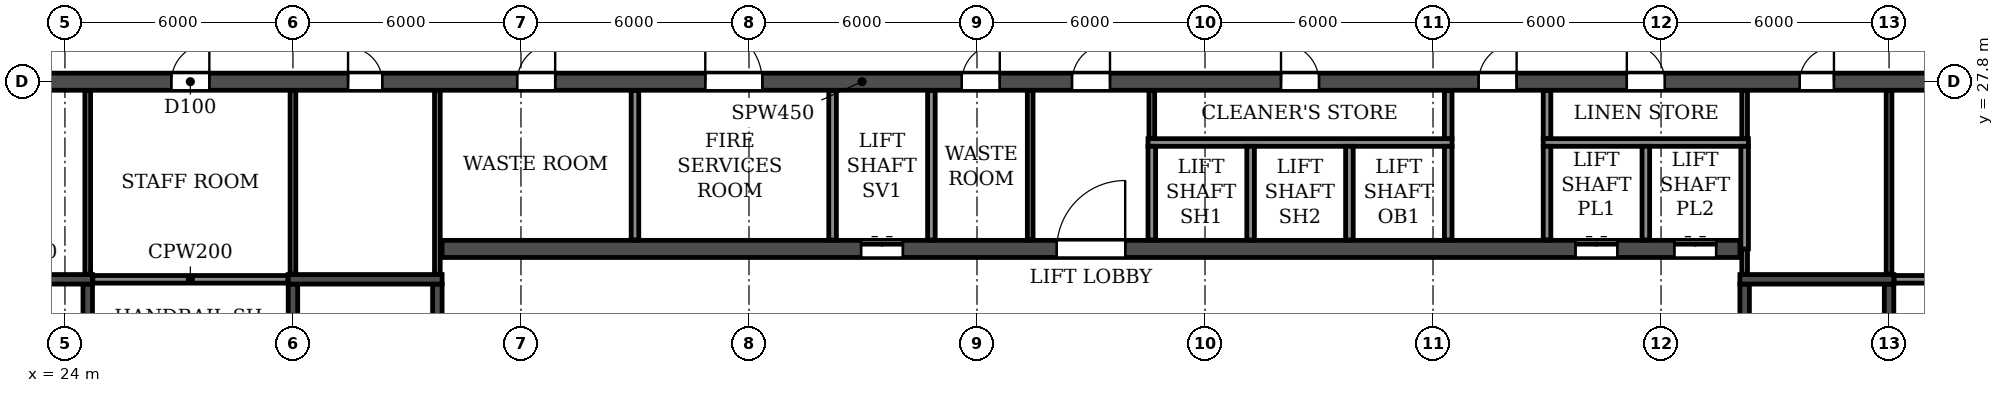
"""IFC4 building model, lengths in metres.
Left out: names, types, materials, properties, quantities, classifications, styles, units other than length and angle.
Written with IfcOpenShell. Run it as: python <this file> out.ifc"""

import sys

from ifc_helpers import new_model, si_unit, direction, frame, frame_2d, origin, place, context, subcontext, project, spatial, rectangle, extrude, element, fill, save


model = new_model("IFC4")
c1 = context("Model", 3, precision=1e-05, world=origin(), true_north=direction((0.0, 1.0)))
c2 = subcontext(c1, "Body", "Model", "MODEL_VIEW")
j1 = project(units=[si_unit("LENGTHUNIT", "METRE"), si_unit("PLANEANGLEUNIT", "RADIAN")], contexts=[c1])
p1 = place(None, origin())
s1 = spatial("IfcSite", under=j1, at=p1, CompositionType="ELEMENT")
p2 = place(p1, origin())
s2 = spatial("IfcBuilding", under=s1, at=p2, CompositionType="ELEMENT")
p3 = place(p2, frame((0.0, 0.0, 19.2)))
s3 = spatial("IfcBuildingStorey", under=s2, at=p3, CompositionType="ELEMENT", Elevation=19.2)
p4 = place(p3, frame((18.0, 27.8, 0.0), z_axis=(0.0, 0.0, 1.0), x_axis=(1.0, 0.0, 0.0)))
e1 = element("IfcWall", 1, at=p4, inside=s3, PredefinedType="SOLIDWALL", context=c2, shape_type="SweptSolid", body=[
    extrude(rectangle(XDim=66.0, YDim=0.45, at=frame_2d((33.0, 0.0))), origin(), (0.0, 0.0, 1.0), 3.95),
])
p5 = place(p4, frame((0.9, 0.0, 0.0)))
e2 = element("IfcOpeningElement", 2, at=p5, cuts=e1, PredefinedType="OPENING", context=c2, shape_type="SweptSolid", body=[
    extrude(rectangle(XDim=1.0, YDim=2.1, at=frame_2d((0.5, 1.05))), frame((0.0, 0.235, 0.0), z_axis=(0.0, -1.0, 0.0), x_axis=(1.0, 0.0, 0.0)), (0.0, 0.0, 1.0), 0.47),
])
p6 = place(p4, frame((4.25, 0.0, 0.0)))
e3 = element("IfcOpeningElement", 3, at=p6, cuts=e1, PredefinedType="OPENING", context=c2, shape_type="SweptSolid", body=[
    extrude(rectangle(XDim=0.9, YDim=2.1, at=frame_2d((0.45, 1.05))), frame((0.0, 0.235, 0.0), z_axis=(0.0, -1.0, 0.0), x_axis=(1.0, 0.0, 0.0)), (0.0, 0.0, 1.0), 0.47),
])
p7 = place(p4, frame((8.8, 0.0, 0.0)))
e4 = element("IfcOpeningElement", 4, at=p7, cuts=e1, PredefinedType="OPENING", context=c2, shape_type="SweptSolid", body=[
    extrude(rectangle(XDim=1.0, YDim=2.1, at=frame_2d((0.5, 1.05))), frame((0.0, 0.235, 0.0), z_axis=(0.0, -1.0, 0.0), x_axis=(1.0, 0.0, 0.0)), (0.0, 0.0, 1.0), 0.47),
])
p8 = place(p4, frame((13.45, 0.0, 0.0)))
e5 = element("IfcOpeningElement", 5, at=p8, cuts=e1, PredefinedType="OPENING", context=c2, shape_type="SweptSolid", body=[
    extrude(rectangle(XDim=0.9, YDim=2.1, at=frame_2d((0.45, 1.05))), frame((0.0, 0.235, 0.0), z_axis=(0.0, -1.0, 0.0), x_axis=(1.0, 0.0, 0.0)), (0.0, 0.0, 1.0), 0.47),
])
p9 = place(p4, frame((17.9, 0.0, 0.0)))
e6 = element("IfcOpeningElement", 6, at=p9, cuts=e1, PredefinedType="OPENING", context=c2, shape_type="SweptSolid", body=[
    extrude(rectangle(XDim=1.0, YDim=2.1, at=frame_2d((0.5, 1.05))), frame((0.0, 0.235, 0.0), z_axis=(0.0, -1.0, 0.0), x_axis=(1.0, 0.0, 0.0)), (0.0, 0.0, 1.0), 0.47),
])
p10 = place(p4, frame((22.85, 0.0, 0.0)))
e7 = element("IfcOpeningElement", 7, at=p10, cuts=e1, PredefinedType="OPENING", context=c2, shape_type="SweptSolid", body=[
    extrude(rectangle(XDim=1.5, YDim=2.1, at=frame_2d((0.75, 1.05))), frame((0.0, 0.235, 0.0), z_axis=(0.0, -1.0, 0.0), x_axis=(1.0, 0.0, 0.0)), (0.0, 0.0, 1.0), 0.47),
])
p11 = place(p4, frame((29.6, 0.0, 0.0)))
e8 = element("IfcOpeningElement", 8, at=p11, cuts=e1, PredefinedType="OPENING", context=c2, shape_type="SweptSolid", body=[
    extrude(rectangle(XDim=1.0, YDim=2.1, at=frame_2d((0.5, 1.05))), frame((0.0, 0.235, 0.0), z_axis=(0.0, -1.0, 0.0), x_axis=(1.0, 0.0, 0.0)), (0.0, 0.0, 1.0), 0.47),
])
p12 = place(p4, frame((32.5, 0.0, 0.0)))
e9 = element("IfcOpeningElement", 9, at=p12, cuts=e1, PredefinedType="OPENING", context=c2, shape_type="SweptSolid", body=[
    extrude(rectangle(XDim=1.0, YDim=2.1, at=frame_2d((0.5, 1.05))), frame((0.0, 0.235, 0.0), z_axis=(0.0, -1.0, 0.0), x_axis=(1.0, 0.0, 0.0)), (0.0, 0.0, 1.0), 0.47),
])
p13 = place(p4, frame((38.0, 0.0, 0.0)))
e10 = element("IfcOpeningElement", 10, at=p13, cuts=e1, PredefinedType="OPENING", context=c2, shape_type="SweptSolid", body=[
    extrude(rectangle(XDim=1.0, YDim=2.1, at=frame_2d((0.5, 1.05))), frame((0.0, 0.235, 0.0), z_axis=(0.0, -1.0, 0.0), x_axis=(1.0, 0.0, 0.0)), (0.0, 0.0, 1.0), 0.47),
])
p14 = place(p4, frame((43.2, 0.0, 0.0)))
e11 = element("IfcOpeningElement", 11, at=p14, cuts=e1, PredefinedType="OPENING", context=c2, shape_type="SweptSolid", body=[
    extrude(rectangle(XDim=1.0, YDim=2.1, at=frame_2d((0.5, 1.05))), frame((0.0, 0.235, 0.0), z_axis=(0.0, -1.0, 0.0), x_axis=(1.0, 0.0, 0.0)), (0.0, 0.0, 1.0), 0.47),
])
p15 = place(p4, frame((47.1, 0.0, 0.0)))
e12 = element("IfcOpeningElement", 12, at=p15, cuts=e1, PredefinedType="OPENING", context=c2, shape_type="SweptSolid", body=[
    extrude(rectangle(XDim=1.0, YDim=2.1, at=frame_2d((0.5, 1.05))), frame((0.0, 0.235, 0.0), z_axis=(0.0, -1.0, 0.0), x_axis=(1.0, 0.0, 0.0)), (0.0, 0.0, 1.0), 0.47),
])
p16 = place(p4, frame((51.65, 0.0, 0.0)))
e13 = element("IfcOpeningElement", 13, at=p16, cuts=e1, PredefinedType="OPENING", context=c2, shape_type="SweptSolid", body=[
    extrude(rectangle(XDim=0.9, YDim=2.1, at=frame_2d((0.45, 1.05))), frame((0.0, 0.235, 0.0), z_axis=(0.0, -1.0, 0.0), x_axis=(1.0, 0.0, 0.0)), (0.0, 0.0, 1.0), 0.47),
])
p17 = place(p4, frame((56.2, 0.0, 0.0)))
e14 = element("IfcOpeningElement", 14, at=p17, cuts=e1, PredefinedType="OPENING", context=c2, shape_type="SweptSolid", body=[
    extrude(rectangle(XDim=1.0, YDim=2.1, at=frame_2d((0.5, 1.05))), frame((0.0, 0.235, 0.0), z_axis=(0.0, -1.0, 0.0), x_axis=(1.0, 0.0, 0.0)), (0.0, 0.0, 1.0), 0.47),
])
p18 = place(p4, frame((60.85, 0.0, 0.0)))
e15 = element("IfcOpeningElement", 15, at=p18, cuts=e1, PredefinedType="OPENING", context=c2, shape_type="SweptSolid", body=[
    extrude(rectangle(XDim=0.9, YDim=2.1, at=frame_2d((0.45, 1.05))), frame((0.0, 0.235, 0.0), z_axis=(0.0, -1.0, 0.0), x_axis=(1.0, 0.0, 0.0)), (0.0, 0.0, 1.0), 0.47),
])
p19 = place(p4, frame((64.1, 0.0, 0.0)))
e16 = element("IfcOpeningElement", 16, at=p19, cuts=e1, PredefinedType="OPENING", context=c2, shape_type="SweptSolid", body=[
    extrude(rectangle(XDim=1.0, YDim=2.1, at=frame_2d((0.5, 1.05))), frame((0.0, 0.235, 0.0), z_axis=(0.0, -1.0, 0.0), x_axis=(1.0, 0.0, 0.0)), (0.0, 0.0, 1.0), 0.47),
])
p20 = place(p3, frame((33.925, 23.4, 0.0), z_axis=(0.0, 0.0, 1.0), x_axis=(1.0, 0.0, 0.0)))
e17 = element("IfcWall", 17, at=p20, inside=s3, PredefinedType="SOLIDWALL", context=c2, shape_type="SweptSolid", body=[
    extrude(rectangle(XDim=34.15, YDim=0.45, at=frame_2d((17.075, 0.0))), origin(), (0.0, 0.0, 1.0), 3.95),
])
p21 = place(p20, frame((16.175, 0.0, 0.0)))
e18 = element("IfcOpeningElement", 18, at=p21, cuts=e17, PredefinedType="OPENING", context=c2, shape_type="SweptSolid", body=[
    extrude(rectangle(XDim=1.8, YDim=2.1, at=frame_2d((0.9, 1.05))), frame((0.0, 0.235, 0.0), z_axis=(0.0, -1.0, 0.0), x_axis=(1.0, 0.0, 0.0)), (0.0, 0.0, 1.0), 0.47),
])
p22 = place(p20, frame((11.025, 0.0, 0.0)))
e19 = element("IfcOpeningElement", 19, at=p22, cuts=e17, PredefinedType="OPENING", context=c2, shape_type="SweptSolid", body=[
    extrude(rectangle(XDim=1.1, YDim=2.1, at=frame_2d((0.55, 1.05))), frame((0.0, 0.235, 0.0), z_axis=(0.0, -1.0, 0.0), x_axis=(1.0, 0.0, 0.0)), (0.0, 0.0, 1.0), 0.47),
])
p23 = place(p20, frame((29.825, 0.0, 0.0)))
e20 = element("IfcOpeningElement", 20, at=p23, cuts=e17, PredefinedType="OPENING", context=c2, shape_type="SweptSolid", body=[
    extrude(rectangle(XDim=1.1, YDim=2.1, at=frame_2d((0.55, 1.05))), frame((0.0, 0.235, 0.0), z_axis=(0.0, -1.0, 0.0), x_axis=(1.0, 0.0, 0.0)), (0.0, 0.0, 1.0), 0.47),
])
p24 = place(p20, frame((32.425, 0.0, 0.0)))
e21 = element("IfcOpeningElement", 21, at=p24, cuts=e17, PredefinedType="OPENING", context=c2, shape_type="SweptSolid", body=[
    extrude(rectangle(XDim=1.1, YDim=2.1, at=frame_2d((0.55, 1.05))), frame((0.0, 0.235, 0.0), z_axis=(0.0, -1.0, 0.0), x_axis=(1.0, 0.0, 0.0)), (0.0, 0.0, 1.0), 0.47),
])
p25 = place(p3, frame((30.0, 14.825, 0.0), z_axis=(0.0, 0.0, 1.0), x_axis=(0.0, 1.0, 0.0)))
e22 = element("IfcWall", 22, at=p25, inside=s3, PredefinedType="SOLIDWALL", context=c2, shape_type="SweptSolid", body=[
    extrude(rectangle(XDim=7.65, YDim=0.25, at=frame_2d((3.825, 0.0))), origin(), (0.0, 0.0, 1.0), 3.95),
])
p26 = place(p3, frame((33.8, 14.825, 0.0), z_axis=(0.0, 0.0, 1.0), x_axis=(0.0, 1.0, 0.0)))
e23 = element("IfcWall", 23, at=p26, inside=s3, PredefinedType="SOLIDWALL", context=c2, shape_type="SweptSolid", body=[
    extrude(rectangle(XDim=7.65, YDim=0.25, at=frame_2d((3.825, 0.0))), origin(), (0.0, 0.0, 1.0), 3.95),
])
p27 = place(p26, frame((0.475, 0.0, 0.0)))
e24 = element("IfcOpeningElement", 24, at=p27, cuts=e23, PredefinedType="OPENING", context=c2, shape_type="SweptSolid", body=[
    extrude(rectangle(XDim=1.0, YDim=2.1, at=frame_2d((0.5, 1.05))), frame((0.0, 0.135, 0.0), z_axis=(0.0, -1.0, 0.0), x_axis=(1.0, 0.0, 0.0)), (0.0, 0.0, 1.0), 0.27),
])
p28 = place(p3, frame((29.875, 22.6, 0.0), z_axis=(0.0, 0.0, 1.0), x_axis=(1.0, 0.0, 0.0)))
e25 = element("IfcWall", 25, at=p28, inside=s3, PredefinedType="SOLIDWALL", context=c2, shape_type="SweptSolid", body=[
    extrude(rectangle(XDim=4.05, YDim=0.25, at=frame_2d((2.025, 0.0))), origin(), (0.0, 0.0, 1.0), 3.95),
])
p29 = place(p3, frame((68.2, 14.825, 0.0), z_axis=(0.0, 0.0, 1.0), x_axis=(0.0, 1.0, 0.0)))
e26 = element("IfcWall", 26, at=p29, inside=s3, PredefinedType="SOLIDWALL", context=c2, shape_type="SweptSolid", body=[
    extrude(rectangle(XDim=7.65, YDim=0.25, at=frame_2d((3.825, 0.0))), origin(), (0.0, 0.0, 1.0), 3.95),
])
p30 = place(p29, frame((0.475, 0.0, 0.0)))
e27 = element("IfcOpeningElement", 27, at=p30, cuts=e26, PredefinedType="OPENING", context=c2, shape_type="SweptSolid", body=[
    extrude(rectangle(XDim=1.0, YDim=2.1, at=frame_2d((0.5, 1.05))), frame((0.0, 0.135, 0.0), z_axis=(0.0, -1.0, 0.0), x_axis=(1.0, 0.0, 0.0)), (0.0, 0.0, 1.0), 0.27),
])
p31 = place(p3, frame((72.0, 14.825, 0.0), z_axis=(0.0, 0.0, 1.0), x_axis=(0.0, 1.0, 0.0)))
e28 = element("IfcWall", 28, at=p31, inside=s3, PredefinedType="SOLIDWALL", context=c2, shape_type="SweptSolid", body=[
    extrude(rectangle(XDim=7.65, YDim=0.25, at=frame_2d((3.825, 0.0))), origin(), (0.0, 0.0, 1.0), 3.95),
])
p32 = place(p3, frame((68.075, 22.6, 0.0), z_axis=(0.0, 0.0, 1.0), x_axis=(1.0, 0.0, 0.0)))
e29 = element("IfcWall", 29, at=p32, inside=s3, PredefinedType="SOLIDWALL", context=c2, shape_type="SweptSolid", body=[
    extrude(rectangle(XDim=4.05, YDim=0.25, at=frame_2d((2.025, 0.0))), origin(), (0.0, 0.0, 1.0), 3.95),
])
p33 = place(p3, frame((24.6, 14.825, 0.0), z_axis=(0.0, 0.0, 1.0), x_axis=(0.0, 1.0, 0.0)))
e30 = element("IfcWall", 30, at=p33, inside=s3, PredefinedType="SOLIDWALL", context=c2, shape_type="SweptSolid", body=[
    extrude(rectangle(XDim=7.65, YDim=0.25, at=frame_2d((3.825, 0.0))), origin(), (0.0, 0.0, 1.0), 3.95),
])
p34 = place(p3, frame((20.675, 22.6, 0.0), z_axis=(0.0, 0.0, 1.0), x_axis=(1.0, 0.0, 0.0)))
e31 = element("IfcWall", 31, at=p34, inside=s3, PredefinedType="SOLIDWALL", context=c2, shape_type="SweptSolid", body=[
    extrude(rectangle(XDim=4.05, YDim=0.25, at=frame_2d((2.025, 0.0))), origin(), (0.0, 0.0, 1.0), 3.95),
])
p35 = place(p3, frame((49.4, 23.635, 0.0), z_axis=(0.0, 0.0, 1.0), x_axis=(0.0, 1.0, 0.0)))
e32 = element("IfcWall", 32, at=p35, inside=s3, PredefinedType="PARTITIONING", context=c2, shape_type="SweptSolid", body=[
    extrude(rectangle(XDim=3.93, YDim=0.15, at=frame_2d((1.965, 0.0))), origin(), (0.0, 0.0, 1.0), 3.95),
])
p36 = place(p3, frame((52.6, 26.3, 0.0), z_axis=(0.0, 0.0, 1.0), x_axis=(0.0, 1.0, 0.0)))
e33 = element("IfcWall", 33, at=p36, inside=s3, PredefinedType="PARTITIONING", context=c2, shape_type="SweptSolid", body=[
    extrude(rectangle(XDim=1.265, YDim=0.15, at=frame_2d((0.632, 0.0))), origin(), (0.0, 0.0, 1.0), 3.95),
])
p37 = place(p3, frame((39.0, 23.635, 0.0), z_axis=(0.0, 0.0, 1.0), x_axis=(0.0, 1.0, 0.0)))
e34 = element("IfcWall", 34, at=p37, inside=s3, PredefinedType="PARTITIONING", context=c2, shape_type="SweptSolid", body=[
    extrude(rectangle(XDim=3.93, YDim=0.2, at=frame_2d((1.965, 0.0))), origin(), (0.0, 0.0, 1.0), 3.95),
])
for number, where, z_axis, x_axis in (
    (35, (60.4, 26.3, 0.0), (0.0, 0.0, 1.0), (0.0, 1.0, 0.0)),
    (36, (63.0, 26.3, 0.0), (0.0, 0.0, 1.0), (0.0, 1.0, 0.0)),
):
    element("IfcWall", number, at=place(p3, frame(where, z_axis=z_axis, x_axis=x_axis)), inside=s3, PredefinedType="PARTITIONING", context=c2, shape_type="SweptSolid", body=[
        extrude(rectangle(XDim=1.265, YDim=0.2, at=frame_2d((0.632, 0.0))), origin(), (0.0, 0.0, 1.0), 3.95),
    ])
for number, where, z_axis, x_axis in (
    (37, (24.735, 22.6, 0.0), (0.0, 0.0, 1.0), (1.0, 0.0, 0.0)),
    (38, (72.135, 22.6, 0.0), (0.0, 0.0, 1.0), (1.0, 0.0, 0.0)),
):
    element("IfcWall", number, at=place(p3, frame(where, z_axis=z_axis, x_axis=x_axis)), inside=s3, PredefinedType="PARTITIONING", context=c2, shape_type="SweptSolid", body=[
        extrude(rectangle(XDim=5.13, YDim=0.2, at=frame_2d((2.565, 0.0))), origin(), (0.0, 0.0, 1.0), 3.95),
    ])
for number, where, z_axis, x_axis in (
    (39, (24.6, 22.735, 0.0), (0.0, 0.0, 1.0), (0.0, 1.0, 0.0)),
    (40, (30.0, 22.735, 0.0), (0.0, 0.0, 1.0), (0.0, 1.0, 0.0)),
    (41, (33.8, 22.735, 0.0), (0.0, 0.0, 1.0), (0.0, 1.0, 0.0)),
):
    element("IfcWall", number, at=place(p3, frame(where, z_axis=z_axis, x_axis=x_axis)), inside=s3, PredefinedType="PARTITIONING", context=c2, shape_type="SweptSolid", body=[
        extrude(rectangle(XDim=4.83, YDim=0.15, at=frame_2d((2.415, 0.0))), origin(), (0.0, 0.0, 1.0), 3.95),
    ])
p38 = place(p3, frame((68.2, 22.735, 0.0), z_axis=(0.0, 0.0, 1.0), x_axis=(0.0, 1.0, 0.0)))
e42 = element("IfcWall", 42, at=p38, inside=s3, PredefinedType="PARTITIONING", context=c2, shape_type="SweptSolid", body=[
    extrude(rectangle(XDim=0.665, YDim=0.15, at=frame_2d((0.333, 0.0))), origin(), (0.0, 0.0, 1.0), 3.95),
])
p39 = place(p3, frame((68.2, 26.3, 0.0), z_axis=(0.0, 0.0, 1.0), x_axis=(0.0, 1.0, 0.0)))
e43 = element("IfcWall", 43, at=p39, inside=s3, PredefinedType="PARTITIONING", context=c2, shape_type="SweptSolid", body=[
    extrude(rectangle(XDim=1.265, YDim=0.15, at=frame_2d((0.632, 0.0))), origin(), (0.0, 0.0, 1.0), 3.95),
])
p40 = place(p3, frame((72.0, 22.735, 0.0), z_axis=(0.0, 0.0, 1.0), x_axis=(0.0, 1.0, 0.0)))
e44 = element("IfcWall", 44, at=p40, inside=s3, PredefinedType="PARTITIONING", context=c2, shape_type="SweptSolid", body=[
    extrude(rectangle(XDim=4.83, YDim=0.15, at=frame_2d((2.415, 0.0))), origin(), (0.0, 0.0, 1.0), 3.95),
])
p41 = place(p3, frame((52.5, 26.2, 0.0), z_axis=(0.0, 0.0, 1.0), x_axis=(1.0, 0.0, 0.0)))
e45 = element("IfcWall", 45, at=p41, inside=s3, PredefinedType="PARTITIONING", context=c2, shape_type="SweptSolid", body=[
    extrude(rectangle(XDim=8.0, YDim=0.2, at=frame_2d((4.0, 0.0))), origin(), (0.0, 0.0, 1.0), 3.95),
])
p42 = place(p3, frame((62.9, 26.2, 0.0), z_axis=(0.0, 0.0, 1.0), x_axis=(1.0, 0.0, 0.0)))
e46 = element("IfcWall", 46, at=p42, inside=s3, PredefinedType="PARTITIONING", context=c2, shape_type="SweptSolid", body=[
    extrude(rectangle(XDim=5.4, YDim=0.2, at=frame_2d((2.7, 0.0))), origin(), (0.0, 0.0, 1.0), 3.95),
])
for number, where, z_axis, x_axis in (
    (47, (44.2, 23.635, 0.0), (0.0, 0.0, 1.0), (0.0, 1.0, 0.0)),
    (48, (46.8, 23.635, 0.0), (0.0, 0.0, 1.0), (0.0, 1.0, 0.0)),
):
    element("IfcWall", number, at=place(p3, frame(where, z_axis=z_axis, x_axis=x_axis)), inside=s3, PredefinedType="PARTITIONING", context=c2, shape_type="SweptSolid", body=[
        extrude(rectangle(XDim=3.93, YDim=0.2, at=frame_2d((1.965, 0.0))), origin(), (0.0, 0.0, 1.0), 3.95),
    ])
for number, where, z_axis, x_axis in (
    (49, (52.6, 23.635, 0.0), (0.0, 0.0, 1.0), (0.0, 1.0, 0.0)),
    (50, (55.2, 23.635, 0.0), (0.0, 0.0, 1.0), (0.0, 1.0, 0.0)),
    (51, (57.8, 23.635, 0.0), (0.0, 0.0, 1.0), (0.0, 1.0, 0.0)),
    (52, (60.4, 23.635, 0.0), (0.0, 0.0, 1.0), (0.0, 1.0, 0.0)),
    (53, (63.0, 23.635, 0.0), (0.0, 0.0, 1.0), (0.0, 1.0, 0.0)),
    (54, (65.6, 23.635, 0.0), (0.0, 0.0, 1.0), (0.0, 1.0, 0.0)),
):
    element("IfcWall", number, at=place(p3, frame(where, z_axis=z_axis, x_axis=x_axis)), inside=s3, PredefinedType="PARTITIONING", context=c2, shape_type="SweptSolid", body=[
        extrude(rectangle(XDim=2.465, YDim=0.2, at=frame_2d((1.232, 0.0))), origin(), (0.0, 0.0, 1.0), 3.95),
    ])
p43 = place(p3, frame((68.2, 23.4, 0.0), z_axis=(0.0, 0.0, 1.0), x_axis=(0.0, 1.0, 0.0)))
e55 = element("IfcWall", 55, at=p43, inside=s3, PredefinedType="PARTITIONING", context=c2, shape_type="SweptSolid", body=[
    extrude(rectangle(XDim=2.7, YDim=0.2, at=frame_2d((1.35, 0.0))), origin(), (0.0, 0.0, 1.0), 3.95),
])
p44 = place(p7, origin())
e56 = element("IfcDoor", 56, at=p44, inside=s3, OperationType="SINGLE_SWING_RIGHT", PredefinedType="DOOR", context=c2, shape_type="SweptSolid", body=[
    extrude(rectangle(XDim=1.0, YDim=2.1, at=frame_2d((0.5, 1.05))), frame((0.0, 0.025, 0.0), z_axis=(0.0, -1.0, 0.0), x_axis=(1.0, 0.0, 0.0)), (0.0, 0.0, 1.0), 0.05),
])
fill(e4, e56)
p45 = place(p8, origin())
e57 = element("IfcDoor", 57, at=p45, inside=s3, OperationType="SINGLE_SWING_LEFT", PredefinedType="DOOR", context=c2, shape_type="SweptSolid", body=[
    extrude(rectangle(XDim=0.9, YDim=2.1, at=frame_2d((0.45, 1.05))), frame((0.0, 0.025, 0.0), z_axis=(0.0, -1.0, 0.0), x_axis=(1.0, 0.0, 0.0)), (0.0, 0.0, 1.0), 0.05),
])
fill(e5, e57)
p46 = place(p9, origin())
e58 = element("IfcDoor", 58, at=p46, inside=s3, OperationType="SINGLE_SWING_RIGHT", PredefinedType="DOOR", context=c2, shape_type="SweptSolid", body=[
    extrude(rectangle(XDim=1.0, YDim=2.1, at=frame_2d((0.5, 1.05))), frame((0.0, 0.025, 0.0), z_axis=(0.0, -1.0, 0.0), x_axis=(1.0, 0.0, 0.0)), (0.0, 0.0, 1.0), 0.05),
])
fill(e6, e58)
p47 = place(p10, origin())
e59 = element("IfcDoor", 59, at=p47, inside=s3, OperationType="DOUBLE_DOOR_SINGLE_SWING", PredefinedType="DOOR", context=c2, shape_type="SweptSolid", body=[
    extrude(rectangle(XDim=1.5, YDim=2.1, at=frame_2d((0.75, 1.05))), frame((0.0, 0.025, 0.0), z_axis=(0.0, -1.0, 0.0), x_axis=(1.0, 0.0, 0.0)), (0.0, 0.0, 1.0), 0.05),
])
fill(e7, e59)
p48 = place(p11, origin())
e60 = element("IfcDoor", 60, at=p48, inside=s3, OperationType="SINGLE_SWING_RIGHT", PredefinedType="DOOR", context=c2, shape_type="SweptSolid", body=[
    extrude(rectangle(XDim=1.0, YDim=2.1, at=frame_2d((0.5, 1.05))), frame((0.0, 0.025, 0.0), z_axis=(0.0, -1.0, 0.0), x_axis=(1.0, 0.0, 0.0)), (0.0, 0.0, 1.0), 0.05),
])
fill(e8, e60)
p49 = place(p12, origin())
e61 = element("IfcDoor", 61, at=p49, inside=s3, OperationType="SINGLE_SWING_RIGHT", PredefinedType="DOOR", context=c2, shape_type="SweptSolid", body=[
    extrude(rectangle(XDim=1.0, YDim=2.1, at=frame_2d((0.5, 1.05))), frame((0.0, 0.025, 0.0), z_axis=(0.0, -1.0, 0.0), x_axis=(1.0, 0.0, 0.0)), (0.0, 0.0, 1.0), 0.05),
])
fill(e9, e61)
p50 = place(p13, origin())
e62 = element("IfcDoor", 62, at=p50, inside=s3, OperationType="SINGLE_SWING_LEFT", PredefinedType="DOOR", context=c2, shape_type="SweptSolid", body=[
    extrude(rectangle(XDim=1.0, YDim=2.1, at=frame_2d((0.5, 1.05))), frame((0.0, 0.025, 0.0), z_axis=(0.0, -1.0, 0.0), x_axis=(1.0, 0.0, 0.0)), (0.0, 0.0, 1.0), 0.05),
])
fill(e10, e62)
p51 = place(p14, origin())
e63 = element("IfcDoor", 63, at=p51, inside=s3, OperationType="SINGLE_SWING_RIGHT", PredefinedType="DOOR", context=c2, shape_type="SweptSolid", body=[
    extrude(rectangle(XDim=1.0, YDim=2.1, at=frame_2d((0.5, 1.05))), frame((0.0, 0.025, 0.0), z_axis=(0.0, -1.0, 0.0), x_axis=(1.0, 0.0, 0.0)), (0.0, 0.0, 1.0), 0.05),
])
fill(e11, e63)
p52 = place(p15, origin())
e64 = element("IfcDoor", 64, at=p52, inside=s3, OperationType="SINGLE_SWING_LEFT", PredefinedType="DOOR", context=c2, shape_type="SweptSolid", body=[
    extrude(rectangle(XDim=1.0, YDim=2.1, at=frame_2d((0.5, 1.05))), frame((0.0, 0.025, 0.0), z_axis=(0.0, -1.0, 0.0), x_axis=(1.0, 0.0, 0.0)), (0.0, 0.0, 1.0), 0.05),
])
fill(e12, e64)
p53 = place(p16, origin())
e65 = element("IfcDoor", 65, at=p53, inside=s3, OperationType="SINGLE_SWING_RIGHT", PredefinedType="DOOR", context=c2, shape_type="SweptSolid", body=[
    extrude(rectangle(XDim=0.9, YDim=2.1, at=frame_2d((0.45, 1.05))), frame((0.0, 0.025, 0.0), z_axis=(0.0, -1.0, 0.0), x_axis=(1.0, 0.0, 0.0)), (0.0, 0.0, 1.0), 0.05),
])
fill(e13, e65)
p54 = place(p21, origin())
e66 = element("IfcDoor", 66, at=p54, inside=s3, OperationType="DOUBLE_DOOR_SINGLE_SWING", PredefinedType="DOOR", context=c2, shape_type="SweptSolid", body=[
    extrude(rectangle(XDim=1.8, YDim=2.1, at=frame_2d((0.9, 1.05))), frame((0.0, 0.025, 0.0), z_axis=(0.0, -1.0, 0.0), x_axis=(1.0, 0.0, 0.0)), (0.0, 0.0, 1.0), 0.05),
])
fill(e18, e66)
p55 = place(p22, origin())
e67 = element("IfcDoor", 67, at=p55, inside=s3, OperationType="DOUBLE_DOOR_SLIDING", PredefinedType="DOOR", context=c2, shape_type="SweptSolid", body=[
    extrude(rectangle(XDim=1.1, YDim=2.1, at=frame_2d((0.55, 1.05))), frame((0.0, 0.025, 0.0), z_axis=(0.0, -1.0, 0.0), x_axis=(1.0, 0.0, 0.0)), (0.0, 0.0, 1.0), 0.05),
])
fill(e19, e67)
p56 = place(p23, origin())
e68 = element("IfcDoor", 68, at=p56, inside=s3, OperationType="DOUBLE_DOOR_SLIDING", PredefinedType="DOOR", context=c2, shape_type="SweptSolid", body=[
    extrude(rectangle(XDim=1.1, YDim=2.1, at=frame_2d((0.55, 1.05))), frame((0.0, 0.025, 0.0), z_axis=(0.0, -1.0, 0.0), x_axis=(1.0, 0.0, 0.0)), (0.0, 0.0, 1.0), 0.05),
])
fill(e20, e68)
p57 = place(p24, origin())
e69 = element("IfcDoor", 69, at=p57, inside=s3, OperationType="DOUBLE_DOOR_SLIDING", PredefinedType="DOOR", context=c2, shape_type="SweptSolid", body=[
    extrude(rectangle(XDim=1.1, YDim=2.1, at=frame_2d((0.55, 1.05))), frame((0.0, 0.025, 0.0), z_axis=(0.0, -1.0, 0.0), x_axis=(1.0, 0.0, 0.0)), (0.0, 0.0, 1.0), 0.05),
])
fill(e21, e69)
save(model, sys.argv[1])
